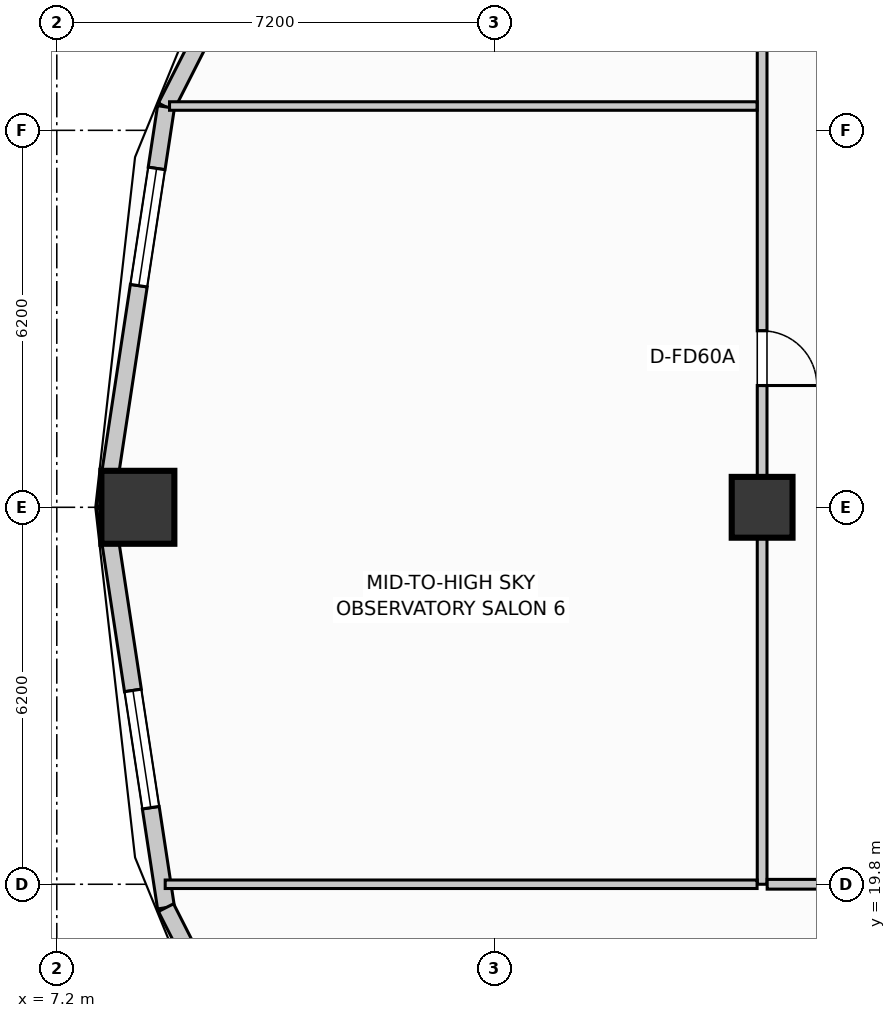
"""IFC4 building model, lengths in metres.
Left out: names, types, materials, properties, quantities, classifications, styles, units other than length and angle.
Written with IfcOpenShell. Run it as: python <this file> out.ifc"""

import sys

from ifc_helpers import new_model, si_unit, direction, frame, frame_2d, origin, origin_2d, place, context, subcontext, project, spatial, rectangle, extrude, element, fill, save


model = new_model("IFC4")
c1 = context("Model", 3, precision=1e-05, world=origin(), true_north=direction((0.0, 1.0)))
c2 = subcontext(c1, "Body", "Model", "MODEL_VIEW")
j1 = project(units=[si_unit("LENGTHUNIT", "METRE"), si_unit("PLANEANGLEUNIT", "RADIAN")], contexts=[c1])
p1 = place(None, origin())
s1 = spatial("IfcSite", under=j1, at=p1, CompositionType="ELEMENT")
p2 = place(p1, origin())
s2 = spatial("IfcBuilding", under=s1, at=p2, CompositionType="ELEMENT")
p3 = place(p2, frame((0.0, 0.0, 200.35)))
s3 = spatial("IfcBuildingStorey", under=s2, at=p3, CompositionType="ELEMENT", Elevation=200.35)
p4 = place(p3, frame((18.8, 26.0, 0.0), z_axis=(0.0, 0.0, 1.0), x_axis=(1.0, 0.0, 0.0)))
e1 = element("IfcColumn", 1, at=p4, inside=s3, PredefinedType="COLUMN", context=c2, shape_type="SweptSolid", body=[
    extrude(rectangle(XDim=1.0, YDim=1.0, at=origin_2d()), origin(), (0.0, 0.0, 1.0), 4.5),
])
p5 = place(p3, frame((8.534, 26.0, 0.0), z_axis=(0.0, 0.0, 1.0), x_axis=(-1.0, 0.0, 0.0)))
e2 = element("IfcColumn", 2, at=p5, inside=s3, PredefinedType="COLUMN", context=c2, shape_type="SweptSolid", body=[
    extrude(rectangle(XDim=1.2, YDim=1.2, at=origin_2d()), origin(), (0.0, 0.0, 1.0), 4.5),
])
p6 = place(p3, frame((11.994, 38.485, 0.0), z_axis=(0.0, 0.0, 1.0), x_axis=(-0.453032066879, -0.89149422117, 0.0)))
e3 = element("IfcWall", 3, at=p6, inside=s3, PredefinedType="STANDARD", context=c2, shape_type="SweptSolid", body=[
    extrude(rectangle(XDim=6.619, YDim=0.28, at=frame_2d((3.31, 0.0))), origin(), (0.0, 0.0, 1.0), 3.691),
])
p7 = place(p3, frame((8.996, 32.585, 0.0), z_axis=(0.0, 0.0, 1.0), x_axis=(-0.150467697578, -0.988614926038, 0.0)))
e4 = element("IfcWall", 4, at=p7, inside=s3, PredefinedType="STANDARD", context=c2, shape_type="SweptSolid", body=[
    extrude(rectangle(XDim=6.661, YDim=0.28, at=frame_2d((3.33, 0.0))), origin(), (0.0, 0.0, 1.0), 4.26),
])
p8 = place(p7, frame((1.023, 0.0, 0.75)))
e5 = element("IfcOpeningElement", 5, at=p8, cuts=e4, PredefinedType="OPENING", context=c2, shape_type="SweptSolid", body=[
    extrude(rectangle(XDim=1.95, YDim=1.68, at=frame_2d((0.975, 0.84))), frame((0.0, 0.15, 0.0), z_axis=(0.0, -1.0, 0.0), x_axis=(1.0, 0.0, 0.0)), (0.0, 0.0, 1.0), 0.3),
])
p9 = place(p3, frame((7.994, 26.0, 0.0), z_axis=(0.0, 0.0, 1.0), x_axis=(0.150467697578, -0.988614926038, 0.0)))
e6 = element("IfcWall", 6, at=p9, inside=s3, PredefinedType="STANDARD", context=c2, shape_type="SweptSolid", body=[
    extrude(rectangle(XDim=6.661, YDim=0.28, at=frame_2d((3.33, 0.0))), origin(), (0.0, 0.0, 1.0), 4.26),
])
p10 = place(p9, frame((3.047, 0.0, 0.75)))
e7 = element("IfcOpeningElement", 7, at=p10, cuts=e6, PredefinedType="OPENING", context=c2, shape_type="SweptSolid", body=[
    extrude(rectangle(XDim=1.95, YDim=1.68, at=frame_2d((0.975, 0.84))), frame((0.0, 0.15, 0.0), z_axis=(0.0, -1.0, 0.0), x_axis=(1.0, 0.0, 0.0)), (0.0, 0.0, 1.0), 0.3),
])
p11 = place(p3, frame((8.996, 19.415, 0.0), z_axis=(0.0, 0.0, 1.0), x_axis=(0.453032066879, -0.89149422117, 0.0)))
e8 = element("IfcWall", 8, at=p11, inside=s3, PredefinedType="STANDARD", context=c2, shape_type="SweptSolid", body=[
    extrude(rectangle(XDim=6.619, YDim=0.28, at=frame_2d((3.31, 0.0))), origin(), (0.0, 0.0, 1.0), 3.691),
])
p12 = place(p3, frame((18.8, 19.8, 0.0), z_axis=(0.0, 0.0, 1.0), x_axis=(0.0, 1.0, 0.0)))
e9 = element("IfcWall", 9, at=p12, inside=s3, PredefinedType="PARTITIONING", context=c2, shape_type="SweptSolid", body=[
    extrude(rectangle(XDim=15.75, YDim=0.16, at=frame_2d((7.875, 0.0))), origin(), (0.0, 0.0, 1.0), 4.245),
])
p13 = place(p12, frame((8.203, 0.0, 0.0)))
e10 = element("IfcOpeningElement", 10, at=p13, cuts=e9, PredefinedType="OPENING", context=c2, shape_type="SweptSolid", body=[
    extrude(rectangle(XDim=0.9, YDim=2.0, at=frame_2d((0.45, 1.0))), frame((0.0, 0.09, 0.0), z_axis=(0.0, -1.0, 0.0), x_axis=(1.0, 0.0, 0.0)), (0.0, 0.0, 1.0), 0.18),
])
p14 = place(p12, frame((13.858, 0.0, 0.0)))
e11 = element("IfcOpeningElement", 11, at=p14, cuts=e9, PredefinedType="OPENING", context=c2, shape_type="SweptSolid", body=[
    extrude(rectangle(XDim=0.9, YDim=2.0, at=frame_2d((0.45, 1.0))), frame((0.0, 0.09, 0.0), z_axis=(0.0, -1.0, 0.0), x_axis=(1.0, 0.0, 0.0)), (0.0, 0.0, 1.0), 0.18),
])
p15 = place(p3, frame((18.883, 19.8, 0.0), z_axis=(0.0, 0.0, 1.0), x_axis=(1.0, 0.0, 0.0)))
e12 = element("IfcWall", 12, at=p15, inside=s3, PredefinedType="PARTITIONING", context=c2, shape_type="SweptSolid", body=[
    extrude(rectangle(XDim=2.437, YDim=0.16, at=frame_2d((1.219, 0.0))), origin(), (0.0, 0.0, 1.0), 3.822),
])
p16 = place(p3, frame((8.983, 19.8, 0.0), z_axis=(0.0, 0.0, 1.0), x_axis=(1.0, 0.0, 0.0)))
e13 = element("IfcWall", 13, at=p16, inside=s3, PredefinedType="PARTITIONING", context=c2, shape_type="SweptSolid", body=[
    extrude(rectangle(XDim=9.734, YDim=0.14, at=frame_2d((4.867, 0.0))), origin(), (0.0, 0.0, 1.0), 3.822),
])
p17 = place(p3, frame((9.054, 32.6, 0.0), z_axis=(0.0, 0.0, 1.0), x_axis=(1.0, 0.0, 0.0)))
e14 = element("IfcWall", 14, at=p17, inside=s3, PredefinedType="PARTITIONING", context=c2, shape_type="SweptSolid", body=[
    extrude(rectangle(XDim=9.663, YDim=0.14, at=frame_2d((4.832, 0.0))), origin(), (0.0, 0.0, 1.0), 4.245),
])
p18 = place(p8, origin())
e15 = element("IfcWindow", 15, at=p18, inside=s3, PartitioningType="SINGLE_PANEL", PredefinedType="WINDOW", context=c2, shape_type="SweptSolid", body=[
    extrude(rectangle(XDim=1.95, YDim=1.68, at=frame_2d((0.975, 0.84))), frame((0.0, 0.03, 0.0), z_axis=(0.0, -1.0, 0.0), x_axis=(1.0, 0.0, 0.0)), (0.0, 0.0, 1.0), 0.06),
])
fill(e5, e15)
p19 = place(p10, origin())
e16 = element("IfcWindow", 16, at=p19, inside=s3, PartitioningType="SINGLE_PANEL", PredefinedType="WINDOW", context=c2, shape_type="SweptSolid", body=[
    extrude(rectangle(XDim=1.95, YDim=1.68, at=frame_2d((0.975, 0.84))), frame((0.0, 0.03, 0.0), z_axis=(0.0, -1.0, 0.0), x_axis=(1.0, 0.0, 0.0)), (0.0, 0.0, 1.0), 0.06),
])
fill(e7, e16)
p20 = place(p13, frame((0.9, 0.0, 0.0), z_axis=(0.0, 0.0, 1.0), x_axis=(-1.0, 0.0, 0.0)))
e17 = element("IfcDoor", 17, at=p20, inside=s3, OperationType="SINGLE_SWING_RIGHT", PredefinedType="DOOR", context=c2, shape_type="SweptSolid", body=[
    extrude(rectangle(XDim=0.9, YDim=2.0, at=frame_2d((0.45, 1.0))), frame((0.0, 0.025, 0.0), z_axis=(0.0, -1.0, 0.0), x_axis=(1.0, 0.0, 0.0)), (0.0, 0.0, 1.0), 0.05),
])
fill(e10, e17)
save(model, sys.argv[1])
